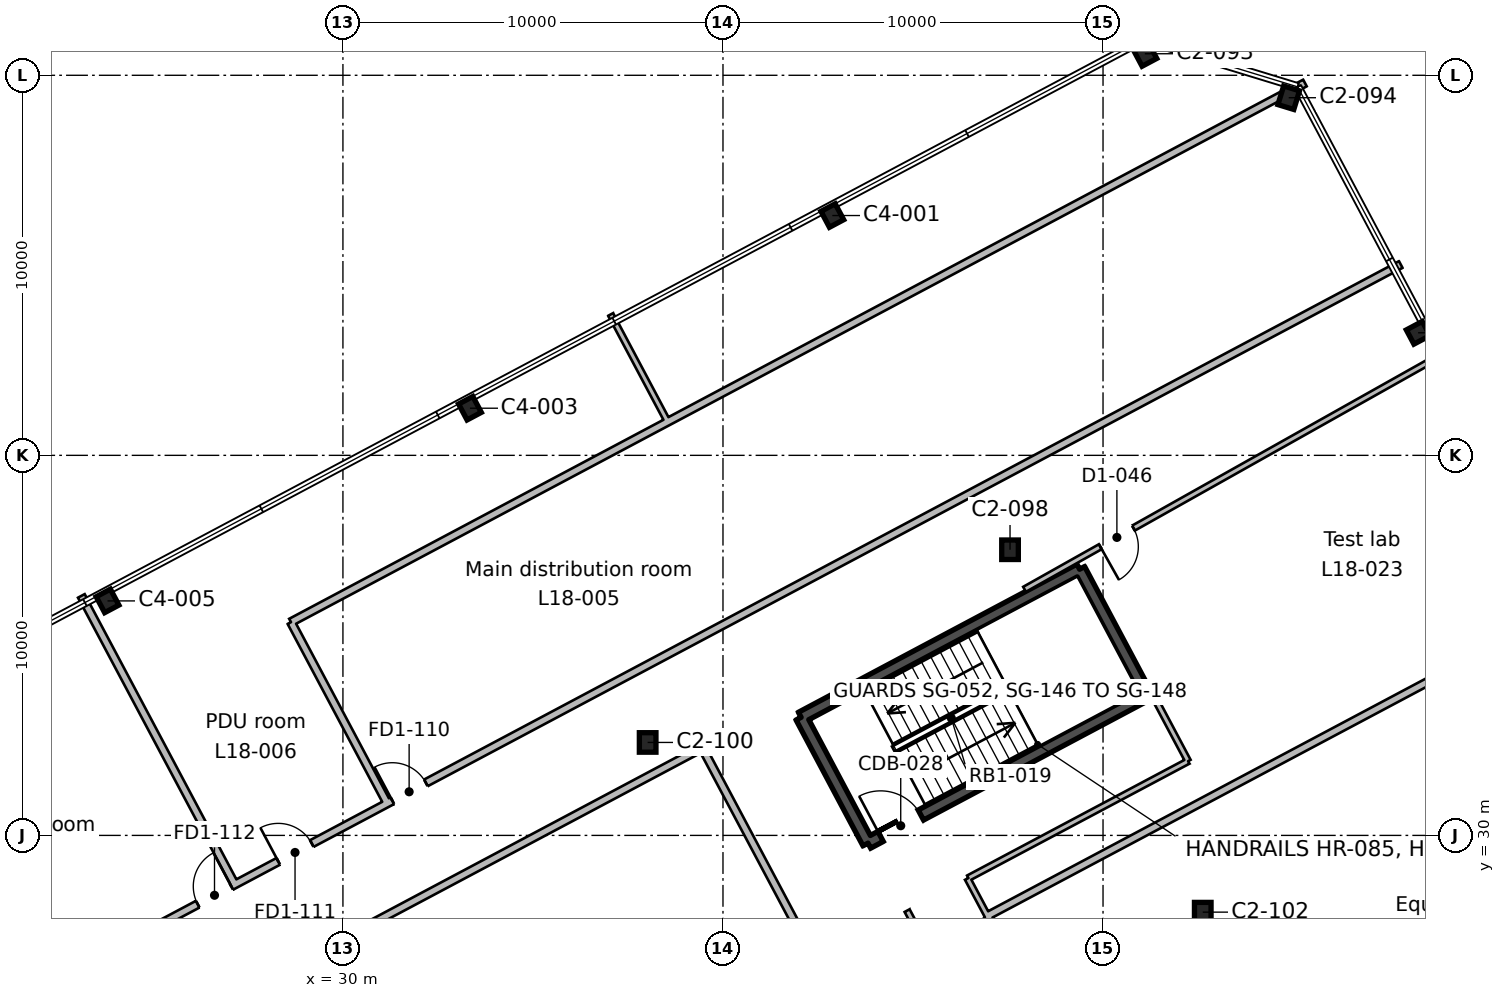
"""IFC4 building model, lengths in metres.
Left out: names, types, materials, properties, quantities, classifications, styles, units other than length and angle.
Written with IfcOpenShell. Run it as: python <this file> out.ifc"""

import sys

from ifc_helpers import new_model, si_unit, direction, frame, frame_2d, origin, origin_2d, place, context, subcontext, project, spatial, rectangle, i_section, extrude, element, fill, save


model = new_model("IFC4")
c1 = context("Model", 3, precision=1e-05, world=origin(), true_north=direction((0.0, 1.0)))
c2 = subcontext(c1, "Body", "Model", "MODEL_VIEW")
j1 = project(units=[si_unit("LENGTHUNIT", "METRE"), si_unit("PLANEANGLEUNIT", "RADIAN")], contexts=[c1])
p1 = place(None, origin())
s1 = spatial("IfcSite", under=j1, at=p1, CompositionType="ELEMENT")
p2 = place(p1, origin())
s2 = spatial("IfcBuilding", under=s1, at=p2, CompositionType="ELEMENT")
p3 = place(p2, frame((0.0, 0.0, 93.8)))
s3 = spatial("IfcBuildingStorey", under=s2, at=p3, CompositionType="ELEMENT", Elevation=93.8)
for number, where, z_axis, x_axis in (
    (1, (52.624, 27.981, 0.0), (0.0, 0.0, 1.0), (1.0, 0.0, 0.0)),
    (2, (38.018, 32.446, 0.0), (0.0, 0.0, 1.0), (1.0, 0.0, 0.0)),
):
    element("IfcColumn", number, at=place(p3, frame(where, z_axis=z_axis, x_axis=x_axis)), inside=s3, PredefinedType="COLUMN", context=c2, shape_type="SweptSolid", body=[
        extrude(i_section(OverallWidth=0.437, OverallDepth=0.513, WebThickness=0.061, FlangeThickness=0.097, FilletRadius=0.015, at=origin_2d()), origin(), (0.0, 0.0, 1.0), 4.6),
    ])
p4 = place(p3, frame((23.806, 36.17, 0.0), z_axis=(0.0, 0.0, 1.0), x_axis=(-0.882947592859, -0.469471562786, 0.0)))
e3 = element("IfcColumn", 3, at=p4, inside=s3, PredefinedType="COLUMN", context=c2, shape_type="SweptSolid", body=[
    extrude(i_section(OverallWidth=0.424, OverallDepth=0.475, WebThickness=0.048, FlangeThickness=0.077, FilletRadius=0.015, at=origin_2d()), origin(), (0.0, 0.0, 1.0), 4.6),
])
p5 = place(p3, frame((47.553, 37.516, 0.0), z_axis=(0.0, 0.0, 1.0), x_axis=(1.0, 0.0, 0.0)))
e4 = element("IfcColumn", 4, at=p5, inside=s3, PredefinedType="COLUMN", context=c2, shape_type="SweptSolid", body=[
    extrude(i_section(OverallWidth=0.437, OverallDepth=0.513, WebThickness=0.061, FlangeThickness=0.097, FilletRadius=0.015, at=origin_2d()), origin(), (0.0, 0.0, 1.0), 4.6),
])
for number, where, z_axis, x_axis in (
    (5, (33.342, 41.24, 0.0), (0.0, 0.0, 1.0), (-0.883, -0.469, 0.0)),
    (6, (58.29, 43.225, 0.0), (0.0, 0.0, 1.0), (-0.469, 0.883, 0.0)),
    (7, (42.877, 46.31, 0.0), (0.0, 0.0, 1.0), (-0.883, -0.469, 0.0)),
):
    element("IfcColumn", number, at=place(p3, frame(where, z_axis=z_axis, x_axis=x_axis)), inside=s3, PredefinedType="COLUMN", context=c2, shape_type="SweptSolid", body=[
        extrude(i_section(OverallWidth=0.424, OverallDepth=0.475, WebThickness=0.048, FlangeThickness=0.077, FilletRadius=0.015, at=origin_2d()), origin(), (0.0, 0.0, 1.0), 4.6),
    ])
for number, where, z_axis, x_axis in (
    (8, (54.886, 49.41, 0.0), (0.0, 0.0, 1.0), (-0.956, 0.292, 0.0)),
    (9, (51.1, 50.567, 0.0), (0.0, 0.0, 1.0), (-0.883, -0.469, 0.0)),
):
    element("IfcColumn", number, at=place(p3, frame(where, z_axis=z_axis, x_axis=x_axis)), inside=s3, PredefinedType="COLUMN", context=c2, shape_type="SweptSolid", body=[
        extrude(i_section(OverallWidth=0.437, OverallDepth=0.513, WebThickness=0.061, FlangeThickness=0.097, FilletRadius=0.015, at=origin_2d()), origin(), (0.0, 0.0, 1.0), 4.6),
    ])
p6 = place(p3, frame((49.384, 37.004, 0.0), z_axis=(0.0, 0.0, 1.0), x_axis=(0.46946936446, -0.882948761726, 0.0)))
e10 = element("IfcWall", 10, at=p6, inside=s3, PredefinedType="SHEAR", context=c2, shape_type="SweptSolid", body=[
    extrude(rectangle(XDim=3.75, YDim=0.3, at=frame_2d((1.875, 0.0))), origin(), (0.0, 0.0, 1.0), 4.6),
])
p7 = place(p3, frame((51.145, 33.693, 0.0), z_axis=(0.0, 0.0, 1.0), x_axis=(-0.882945809314, -0.469474917132, 0.0)))
e11 = element("IfcWall", 11, at=p7, inside=s3, PredefinedType="SHEAR", context=c2, shape_type="SweptSolid", body=[
    extrude(rectangle(XDim=8.3, YDim=0.3, at=frame_2d((4.15, 0.0))), origin(), (0.0, 0.0, 1.0), 4.6),
])
p8 = place(p7, frame((6.725, 0.0, 0.0)))
e12 = element("IfcOpeningElement", 12, at=p8, cuts=e11, PredefinedType="OPENING", context=c2, shape_type="SweptSolid", body=[
    extrude(rectangle(XDim=1.2, YDim=2.1, at=frame_2d((0.6, 1.05))), frame((0.0, 0.16, 0.0), z_axis=(0.0, -1.0, 0.0), x_axis=(1.0, 0.0, 0.0)), (0.0, 0.0, 1.0), 0.32),
])
p9 = place(p3, frame((43.816, 29.796, 0.0), z_axis=(0.0, 0.0, 1.0), x_axis=(-0.46946936446, 0.882948761726, 0.0)))
e13 = element("IfcWall", 13, at=p9, inside=s3, PredefinedType="SHEAR", context=c2, shape_type="SweptSolid", body=[
    extrude(rectangle(XDim=3.75, YDim=0.3, at=frame_2d((1.875, 0.0))), origin(), (0.0, 0.0, 1.0), 4.6),
])
p10 = place(p3, frame((42.055, 33.107, 0.0), z_axis=(0.0, 0.0, 1.0), x_axis=(0.882945809314, 0.469474917132, 0.0)))
e14 = element("IfcWall", 14, at=p10, inside=s3, PredefinedType="SHEAR", context=c2, shape_type="SweptSolid", body=[
    extrude(rectangle(XDim=8.3, YDim=0.3, at=frame_2d((4.15, 0.0))), origin(), (0.0, 0.0, 1.0), 4.6),
])
p11 = place(p3, frame((0.0, 14.27, 0.0), z_axis=(0.0, 0.0, 1.0), x_axis=(0.882946949892, 0.46947277203, 0.0)))
e15 = element("IfcWall", 15, at=p11, inside=s3, PredefinedType="PARTITIONING", context=c2, shape_type="SweptSolid", body=[
    extrude(rectangle(XDim=65.501, YDim=0.2, at=frame_2d((32.75, 0.0))), origin(), (0.0, 0.0, 1.0), 4.2),
])
p12 = place(p11, frame((35.45, 0.0, 0.0)))
e16 = element("IfcOpeningElement", 16, at=p12, cuts=e15, PredefinedType="OPENING", context=c2, shape_type="SweptSolid", body=[
    extrude(rectangle(XDim=1.0, YDim=2.1, at=frame_2d((0.5, 1.05))), frame((0.0, 0.11, 0.0), z_axis=(0.0, -1.0, 0.0), x_axis=(1.0, 0.0, 0.0)), (0.0, 0.0, 1.0), 0.22),
])
p13 = place(p11, frame((32.05, 0.0, 0.0)))
e17 = element("IfcOpeningElement", 17, at=p13, cuts=e15, PredefinedType="OPENING", context=c2, shape_type="SweptSolid", body=[
    extrude(rectangle(XDim=1.0, YDim=2.1, at=frame_2d((0.5, 1.05))), frame((0.0, 0.11, 0.0), z_axis=(0.0, -1.0, 0.0), x_axis=(1.0, 0.0, 0.0)), (0.0, 0.0, 1.0), 0.22),
])
p14 = place(p11, frame((29.65, 0.0, 0.0)))
e18 = element("IfcOpeningElement", 18, at=p14, cuts=e15, PredefinedType="OPENING", context=c2, shape_type="SweptSolid", body=[
    extrude(rectangle(XDim=1.0, YDim=2.1, at=frame_2d((0.5, 1.05))), frame((0.0, 0.11, 0.0), z_axis=(0.0, -1.0, 0.0), x_axis=(1.0, 0.0, 0.0)), (0.0, 0.0, 1.0), 0.22),
])
p15 = place(p11, frame((13.85, 0.0, 0.0)))
e19 = element("IfcOpeningElement", 19, at=p15, cuts=e15, PredefinedType="OPENING", context=c2, shape_type="SweptSolid", body=[
    extrude(rectangle(XDim=1.0, YDim=2.1, at=frame_2d((0.5, 1.05))), frame((0.0, 0.11, 0.0), z_axis=(0.0, -1.0, 0.0), x_axis=(1.0, 0.0, 0.0)), (0.0, 0.0, 1.0), 0.22),
])
p16 = place(p3, frame((23.117, 36.302, 0.0), z_axis=(0.0, 0.0, 1.0), x_axis=(0.469544705103, -0.882908698513, 0.0)))
e20 = element("IfcWall", 20, at=p16, inside=s3, PredefinedType="PARTITIONING", context=c2, shape_type="SweptSolid", body=[
    extrude(rectangle(XDim=8.6, YDim=0.2, at=frame_2d((4.3, 0.0))), origin(), (0.0, 0.0, 1.0), 4.2),
])
p17 = place(p3, frame((31.16, 30.858, 0.0), z_axis=(0.0, 0.0, 1.0), x_axis=(-0.469406117912, 0.882982387404, 0.0)))
e21 = element("IfcWall", 21, at=p17, inside=s3, PredefinedType="PARTITIONING", context=c2, shape_type="SweptSolid", body=[
    extrude(rectangle(XDim=5.383, YDim=0.2, at=frame_2d((2.691, 0.0))), origin(), (0.0, 0.0, 1.0), 4.2),
])
p18 = place(p3, frame((28.633, 35.611, 0.0), z_axis=(0.0, 0.0, 1.0), x_axis=(0.882930875779, 0.469503001691, 0.0)))
e22 = element("IfcWall", 22, at=p18, inside=s3, PredefinedType="PARTITIONING", context=c2, shape_type="SweptSolid", body=[
    extrude(rectangle(XDim=10.641, YDim=0.2, at=frame_2d((5.32, 0.0))), origin(), (0.0, 0.0, 1.0), 4.2),
])
p19 = place(p3, frame((37.044, 43.707, 0.0), z_axis=(0.0, 0.0, 1.0), x_axis=(0.469447181805, -0.882960556025, 0.0)))
e23 = element("IfcWall", 23, at=p19, inside=s3, PredefinedType="PARTITIONING", context=c2, shape_type="SweptSolid", body=[
    extrude(rectangle(XDim=3.199, YDim=0.15, at=frame_2d((1.6, 0.0))), origin(), (0.0, 0.0, 1.0), 4.2),
])
p20 = place(p3, frame((38.028, 40.607, 0.0), z_axis=(0.0, 0.0, 1.0), x_axis=(0.882955326711, 0.469457017237, 0.0)))
e24 = element("IfcWall", 24, at=p20, inside=s3, PredefinedType="PARTITIONING", context=c2, shape_type="SweptSolid", body=[
    extrude(rectangle(XDim=19.576, YDim=0.2, at=frame_2d((9.788, 0.0))), origin(), (0.0, 0.0, 1.0), 4.2),
])
p21 = place(p3, frame((59.054, 42.725, 0.0), z_axis=(0.0, 0.0, 1.0), x_axis=(-0.871718625081, -0.490006774124, 0.0)))
e25 = element("IfcWall", 25, at=p21, inside=s3, PredefinedType="PARTITIONING", context=c2, shape_type="SweptSolid", body=[
    extrude(rectangle(XDim=12.755, YDim=0.15, at=frame_2d((6.378, 0.0))), origin(), (0.0, 0.0, 1.0), 4.2),
])
p22 = place(p21, frame((9.468, 0.0, 0.0)))
e26 = element("IfcOpeningElement", 26, at=p22, cuts=e25, PredefinedType="OPENING", context=c2, shape_type="SweptSolid", body=[
    extrude(rectangle(XDim=1.0, YDim=2.1, at=frame_2d((0.5, 1.05))), frame((0.0, 0.085, 0.0), z_axis=(0.0, -1.0, 0.0), x_axis=(1.0, 0.0, 0.0)), (0.0, 0.0, 1.0), 0.17),
])
p23 = place(p3, frame((45.811, 26.202, 0.0), z_axis=(0.0, 0.0, 1.0), x_axis=(-0.469172559653, 0.883106510716, 0.0)))
e27 = element("IfcWall", 27, at=p23, inside=s3, PredefinedType="PARTITIONING", context=c2, shape_type="SweptSolid", body=[
    extrude(rectangle(XDim=2.06, YDim=0.15, at=frame_2d((1.03, 0.0))), origin(), (0.0, 0.0, 1.0), 4.2),
])
p24 = place(p3, frame((46.958, 27.881, 0.0), z_axis=(0.0, 0.0, 1.0), x_axis=(0.469300305861, -0.883038630479, 0.0)))
e28 = element("IfcWall", 28, at=p24, inside=s3, PredefinedType="PARTITIONING", context=c2, shape_type="SweptSolid", body=[
    extrude(rectangle(XDim=0.984, YDim=0.2, at=frame_2d((0.492, 0.0))), origin(), (0.0, 0.0, 1.0), 4.2),
])
p25 = place(p3, frame((52.239, 31.953, 0.0), z_axis=(0.0, 0.0, 1.0), x_axis=(-0.882908561856, -0.469544962065, 0.0)))
e29 = element("IfcWall", 29, at=p25, inside=s3, PredefinedType="PARTITIONING", context=c2, shape_type="SweptSolid", body=[
    extrude(rectangle(XDim=6.549, YDim=0.15, at=frame_2d((3.274, 0.0))), origin(), (0.0, 0.0, 1.0), 4.2),
])
p26 = place(p3, frame((52.239, 31.953, 0.0), z_axis=(0.0, 0.0, 1.0), x_axis=(-0.469697898274, 0.882827210929, 0.0)))
e30 = element("IfcWall", 30, at=p26, inside=s3, PredefinedType="PARTITIONING", context=c2, shape_type="SweptSolid", body=[
    extrude(rectangle(XDim=2.05, YDim=0.15, at=frame_2d((1.025, 0.0))), origin(), (0.0, 0.0, 1.0), 4.2),
])
p27 = place(p3, frame((46.434, 28.866, 0.0), z_axis=(0.0, 0.0, 1.0), x_axis=(0.469656526593, -0.882849221005, 0.0)))
e31 = element("IfcWall", 31, at=p27, inside=s3, PredefinedType="PARTITIONING", context=c2, shape_type="SweptSolid", body=[
    extrude(rectangle(XDim=1.115, YDim=0.15, at=frame_2d((0.558, 0.0))), origin(), (0.0, 0.0, 1.0), 4.2),
])
p28 = place(p3, frame((62.542, 36.166, 0.0), z_axis=(0.0, 0.0, 1.0), x_axis=(-0.8829766993, -0.469416817438, 0.0)))
e32 = element("IfcWall", 32, at=p28, inside=s3, PredefinedType="PARTITIONING", context=c2, shape_type="SweptSolid", body=[
    extrude(rectangle(XDim=17.649, YDim=0.2, at=frame_2d((8.825, 0.0))), origin(), (0.0, 0.0, 1.0), 4.2),
])
p29 = place(p3, frame((30.623, 27.608, 0.0), z_axis=(0.0, 0.0, 1.0), x_axis=(0.882940863385, 0.469484218867, 0.0)))
e33 = element("IfcWall", 33, at=p29, inside=s3, PredefinedType="PARTITIONING", context=c2, shape_type="SweptSolid", body=[
    extrude(rectangle(XDim=10.0, YDim=0.2, at=frame_2d((5.0, 0.0))), origin(), (0.0, 0.0, 1.0), 4.2),
])
p30 = place(p3, frame((39.453, 32.303, 0.0), z_axis=(0.0, 0.0, 1.0), x_axis=(0.469461333319, -0.882953031887, 0.0)))
e34 = element("IfcWall", 34, at=p30, inside=s3, PredefinedType="PARTITIONING", context=c2, shape_type="SweptSolid", body=[
    extrude(rectangle(XDim=20.0, YDim=0.2, at=frame_2d((10.0, 0.0))), origin(), (0.0, 0.0, 1.0), 4.2),
])
p31 = place(p8, frame((1.2, 0.0, 0.0), z_axis=(0.0, 0.0, 1.0), x_axis=(-1.0, 0.0, 0.0)))
e35 = element("IfcDoor", 35, at=p31, inside=s3, OperationType="SINGLE_SWING_LEFT", PredefinedType="DOOR", context=c2, shape_type="SweptSolid", body=[
    extrude(rectangle(XDim=1.2, YDim=2.1, at=frame_2d((0.6, 1.05))), frame((0.0, 0.025, 0.0), z_axis=(0.0, -1.0, 0.0), x_axis=(1.0, 0.0, 0.0)), (0.0, 0.0, 1.0), 0.05),
])
fill(e12, e35)
p32 = place(p12, origin())
e36 = element("IfcDoor", 36, at=p32, inside=s3, OperationType="SINGLE_SWING_LEFT", PredefinedType="DOOR", context=c2, shape_type="SweptSolid", body=[
    extrude(rectangle(XDim=1.0, YDim=2.1, at=frame_2d((0.5, 1.05))), frame((0.0, 0.025, 0.0), z_axis=(0.0, -1.0, 0.0), x_axis=(1.0, 0.0, 0.0)), (0.0, 0.0, 1.0), 0.05),
])
fill(e16, e36)
p33 = place(p13, origin())
e37 = element("IfcDoor", 37, at=p33, inside=s3, OperationType="SINGLE_SWING_LEFT", PredefinedType="DOOR", context=c2, shape_type="SweptSolid", body=[
    extrude(rectangle(XDim=1.0, YDim=2.1, at=frame_2d((0.5, 1.05))), frame((0.0, 0.025, 0.0), z_axis=(0.0, -1.0, 0.0), x_axis=(1.0, 0.0, 0.0)), (0.0, 0.0, 1.0), 0.05),
])
fill(e17, e37)
p34 = place(p14, origin())
e38 = element("IfcDoor", 38, at=p34, inside=s3, OperationType="SINGLE_SWING_RIGHT", PredefinedType="DOOR", context=c2, shape_type="SweptSolid", body=[
    extrude(rectangle(XDim=1.0, YDim=2.1, at=frame_2d((0.5, 1.05))), frame((0.0, 0.025, 0.0), z_axis=(0.0, -1.0, 0.0), x_axis=(1.0, 0.0, 0.0)), (0.0, 0.0, 1.0), 0.05),
])
fill(e18, e38)
p35 = place(p22, origin())
e39 = element("IfcDoor", 39, at=p35, inside=s3, OperationType="SINGLE_SWING_RIGHT", PredefinedType="DOOR", context=c2, shape_type="SweptSolid", body=[
    extrude(rectangle(XDim=1.0, YDim=2.1, at=frame_2d((0.5, 1.05))), frame((0.0, 0.025, 0.0), z_axis=(0.0, -1.0, 0.0), x_axis=(1.0, 0.0, 0.0)), (0.0, 0.0, 1.0), 0.05),
])
fill(e26, e39)
save(model, sys.argv[1])
